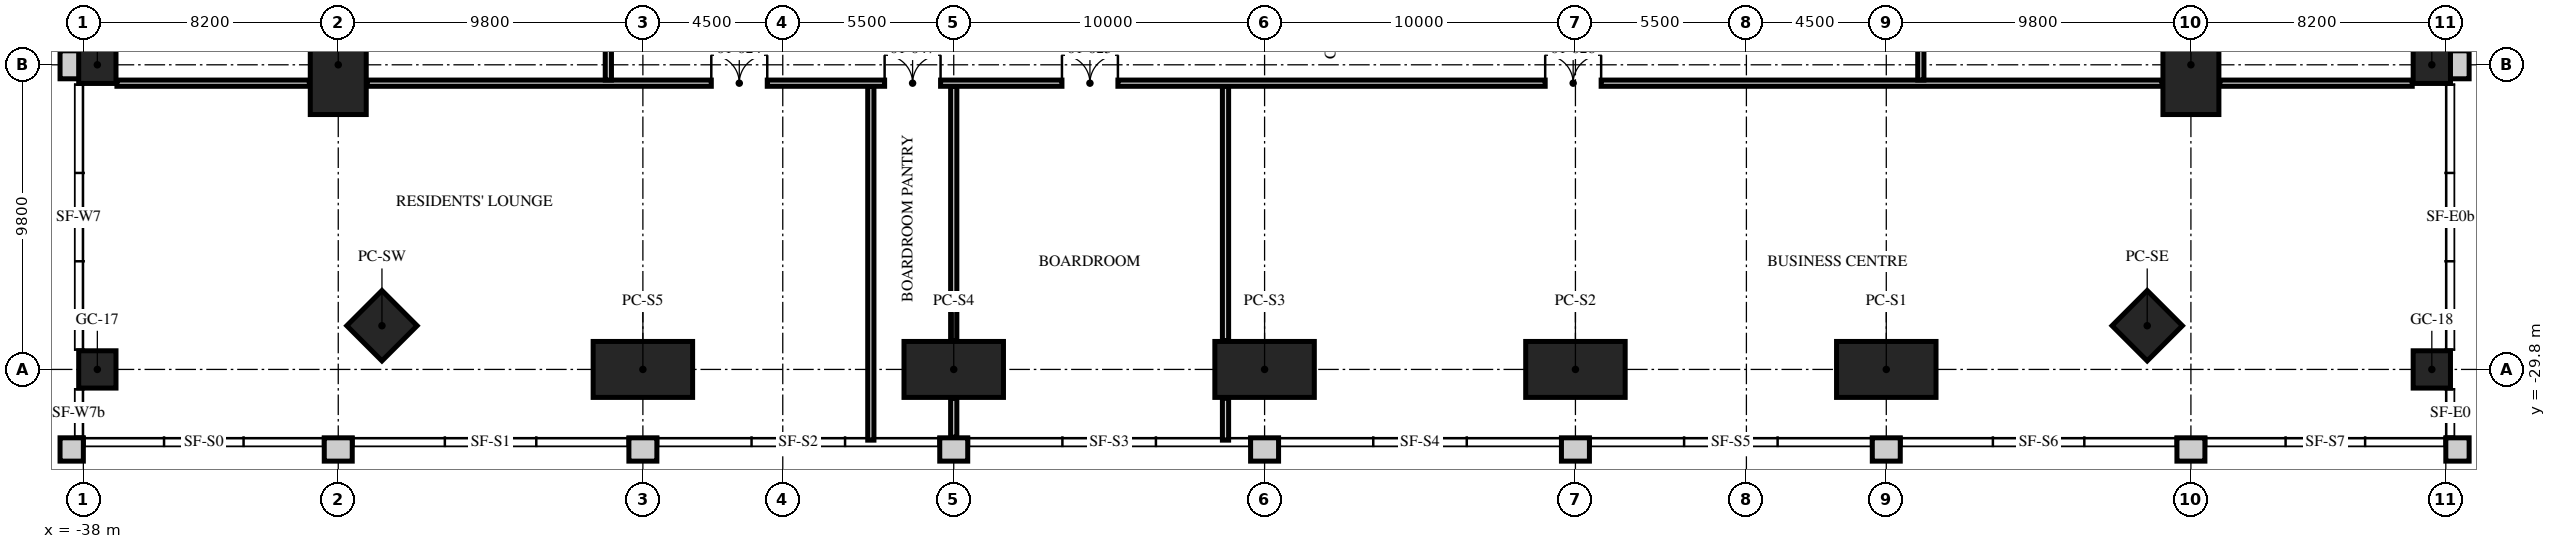
"""IFC4 building model, lengths in metres.
Left out: names, types, materials, properties, quantities, classifications, styles, units other than length and angle.
Written with IfcOpenShell. Run it as: python <this file> out.ifc"""

import sys

from ifc_helpers import new_model, si_unit, direction, frame, frame_2d, origin, origin_2d, place, context, subcontext, project, spatial, rectangle, hollow_rectangle, extrude, element, fill, save


model = new_model("IFC4")
c1 = context("Model", 3, precision=1e-05, world=origin(), true_north=direction((0.0, 1.0)))
c2 = subcontext(c1, "Body", "Model", "MODEL_VIEW")
j1 = project(units=[si_unit("LENGTHUNIT", "METRE"), si_unit("PLANEANGLEUNIT", "RADIAN")], contexts=[c1])
p1 = place(None, origin())
s1 = spatial("IfcSite", under=j1, at=p1, CompositionType="ELEMENT")
p2 = place(p1, origin())
s2 = spatial("IfcBuilding", under=s1, at=p2, CompositionType="ELEMENT")
p3 = place(p2, frame((0.0, 0.0, 6.0)))
s3 = spatial("IfcBuildingStorey", under=s2, at=p3, CompositionType="ELEMENT", Elevation=6.0)
for number, where, z_axis, x_axis in (
    (1, (29.8, -20.0, 0.0), (0.0, 0.0, 1.0), (0.0, 1.0, 0.0)),
    (2, (20.0, -29.8, 0.0), (0.0, 0.0, 1.0), (1.0, 0.0, 0.0)),
    (3, (10.0, -29.8, 0.0), (0.0, 0.0, 1.0), (1.0, 0.0, 0.0)),
    (4, (0.0, -29.8, 0.0), (0.0, 0.0, 1.0), (1.0, 0.0, 0.0)),
    (5, (-10.0, -29.8, 0.0), (0.0, 0.0, 1.0), (1.0, 0.0, 0.0)),
    (6, (-20.0, -29.8, 0.0), (0.0, 0.0, 1.0), (1.0, 0.0, 0.0)),
    (7, (-29.8, -20.0, 0.0), (0.0, 0.0, 1.0), (0.0, 1.0, 0.0)),
):
    element("IfcColumn", number, at=place(p3, frame(where, z_axis=z_axis, x_axis=x_axis)), inside=s3, PredefinedType="COLUMN", context=c2, shape_type="SweptSolid", body=[
        extrude(hollow_rectangle(XDim=3.2, YDim=1.8, WallThickness=0.2, at=origin_2d()), origin(), (0.0, 0.0, 1.0), 5.0),
    ])
for number, where, z_axis, x_axis in (
    (8, (28.394, -28.394, 0.0), (0.0, 0.0, 1.0), (0.707, 0.707, 0.0)),
    (9, (-28.394, -28.394, 0.0), (0.0, 0.0, 1.0), (0.707, -0.707, 0.0)),
):
    element("IfcColumn", number, at=place(p3, frame(where, z_axis=z_axis, x_axis=x_axis)), inside=s3, PredefinedType="COLUMN", context=c2, shape_type="SweptSolid", body=[
        extrude(hollow_rectangle(XDim=1.6, YDim=1.6, WallThickness=0.1, at=origin_2d()), origin(), (0.0, 0.0, 1.0), 5.0),
    ])
for number, where, z_axis, x_axis in (
    (10, (-37.55, -29.8, 0.0), (0.0, 0.0, 1.0), (1.0, 0.0, 0.0)),
    (11, (37.55, -29.8, 0.0), (0.0, 0.0, 1.0), (1.0, 0.0, 0.0)),
    (12, (-37.55, -20.0, 0.0), (0.0, 0.0, 1.0), (1.0, 0.0, 0.0)),
    (13, (37.55, -20.0, 0.0), (0.0, 0.0, 1.0), (1.0, 0.0, 0.0)),
):
    element("IfcColumn", number, at=place(p3, frame(where, z_axis=z_axis, x_axis=x_axis)), inside=s3, PredefinedType="COLUMN", context=c2, shape_type="SweptSolid", body=[
        extrude(rectangle(XDim=1.2, YDim=1.2, at=origin_2d()), origin(), (0.0, 0.0, 1.0), 5.0),
    ])
for number, where, z_axis, x_axis in (
    (14, (-30.25, -32.375, 0.0), (0.0, 0.0, 1.0), (1.0, 0.0, 0.0)),
    (15, (-20.45, -32.375, 0.0), (0.0, 0.0, 1.0), (1.0, 0.0, 0.0)),
    (16, (-10.45, -32.375, 0.0), (0.0, 0.0, 1.0), (1.0, 0.0, 0.0)),
    (17, (-0.45, -32.375, 0.0), (0.0, 0.0, 1.0), (1.0, 0.0, 0.0)),
    (18, (9.55, -32.375, 0.0), (0.0, 0.0, 1.0), (1.0, 0.0, 0.0)),
    (19, (19.55, -32.375, 0.0), (0.0, 0.0, 1.0), (1.0, 0.0, 0.0)),
    (20, (29.35, -32.375, 0.0), (0.0, 0.0, 1.0), (1.0, 0.0, 0.0)),
):
    element("IfcWall", number, at=place(p3, frame(where, z_axis=z_axis, x_axis=x_axis)), inside=s3, PredefinedType="SOLIDWALL", context=c2, shape_type="SweptSolid", body=[
        extrude(rectangle(XDim=0.9, YDim=0.75, at=frame_2d((0.45, 0.0))), origin(), (0.0, 0.0, 1.0), 5.0),
    ])
p4 = place(p3, frame((38.0, -32.375, 0.0), z_axis=(0.0, 0.0, 1.0), x_axis=(1.0, 0.0, 0.0)))
e21 = element("IfcWall", 21, at=p4, inside=s3, PredefinedType="SOLIDWALL", context=c2, shape_type="SweptSolid", body=[
    extrude(rectangle(XDim=0.75, YDim=0.75, at=frame_2d((0.375, 0.0))), origin(), (0.0, 0.0, 1.0), 5.0),
])
for number, where, z_axis, x_axis in (
    (22, (38.375, -20.45, 0.0), (0.0, 0.0, 1.0), (0.0, 1.0, 0.0)),
    (23, (-38.375, -19.55, 0.0), (0.0, 0.0, 1.0), (0.0, -1.0, 0.0)),
):
    element("IfcWall", number, at=place(p3, frame(where, z_axis=z_axis, x_axis=x_axis)), inside=s3, PredefinedType="SOLIDWALL", context=c2, shape_type="SweptSolid", body=[
        extrude(rectangle(XDim=0.9, YDim=0.75, at=frame_2d((0.45, 0.0))), origin(), (0.0, 0.0, 1.0), 5.0),
    ])
p5 = place(p3, frame((-38.375, -32.0, 0.0), z_axis=(0.0, 0.0, 1.0), x_axis=(0.0, -1.0, 0.0)))
e24 = element("IfcWall", 24, at=p5, inside=s3, PredefinedType="SOLIDWALL", context=c2, shape_type="SweptSolid", body=[
    extrude(rectangle(XDim=0.75, YDim=0.75, at=frame_2d((0.375, 0.0))), origin(), (0.0, 0.0, 1.0), 5.0),
])
p6 = place(p3, frame((-12.667, -32.075, 0.0), z_axis=(0.0, 0.0, 1.0), x_axis=(0.0, 1.0, 0.0)))
e25 = element("IfcWall", 25, at=p6, inside=s3, PredefinedType="SOLIDWALL", context=c2, shape_type="SweptSolid", body=[
    extrude(rectangle(XDim=11.384, YDim=0.2, at=frame_2d((5.692, 0.0))), origin(), (0.0, 0.0, 1.0), 3.7),
])
p7 = place(p3, frame((-1.257, -32.075, 0.0), z_axis=(0.0, 0.0, 1.0), x_axis=(0.0, 1.0, 0.0)))
e26 = element("IfcWall", 26, at=p7, inside=s3, PredefinedType="SOLIDWALL", context=c2, shape_type="SweptSolid", body=[
    extrude(rectangle(XDim=1.345, YDim=0.2, at=frame_2d((0.672, 0.0))), origin(), (0.0, 0.0, 1.0), 4.7),
])
p8 = place(p3, frame((-10.0, -31.98, 0.0), z_axis=(0.0, 0.0, 1.0), x_axis=(0.0, 1.0, 0.0)))
e27 = element("IfcWall", 27, at=p8, inside=s3, PredefinedType="SOLIDWALL", context=c2, shape_type="SweptSolid", body=[
    extrude(rectangle(XDim=1.25, YDim=0.2, at=frame_2d((0.625, 0.0))), origin(), (0.0, 0.0, 1.0), 4.7),
])
p9 = place(p3, frame((-10.0, -28.87, 0.0), z_axis=(0.0, 0.0, 1.0), x_axis=(0.0, 1.0, 0.0)))
e28 = element("IfcWall", 28, at=p9, inside=s3, PredefinedType="SOLIDWALL", context=c2, shape_type="SweptSolid", body=[
    extrude(rectangle(XDim=8.179, YDim=0.2, at=frame_2d((4.089, 0.0))), origin(), (0.0, 0.0, 1.0), 3.5),
])
p10 = place(p3, frame((-1.257, -28.87, 0.0), z_axis=(0.0, 0.0, 1.0), x_axis=(0.0, 1.0, 0.0)))
e29 = element("IfcWall", 29, at=p10, inside=s3, PredefinedType="SOLIDWALL", context=c2, shape_type="SweptSolid", body=[
    extrude(rectangle(XDim=8.179, YDim=0.2, at=frame_2d((4.089, 0.0))), origin(), (0.0, 0.0, 1.0), 4.7),
])
p11 = place(p3, frame((-36.92, -20.591, 0.0), z_axis=(0.0, 0.0, 1.0), x_axis=(1.0, 0.0, 0.0)))
e30 = element("IfcWall", 30, at=p11, inside=s3, PredefinedType="SOLIDWALL", context=c2, shape_type="SweptSolid", body=[
    extrude(rectangle(XDim=6.19, YDim=0.2, at=frame_2d((3.095, 0.0))), origin(), (0.0, 0.0, 1.0), 3.7),
])
p12 = place(p3, frame((-28.87, -20.591, 0.0), z_axis=(0.0, 0.0, 1.0), x_axis=(1.0, 0.0, 0.0)))
e31 = element("IfcWall", 31, at=p12, inside=s3, PredefinedType="SOLIDWALL", context=c2, shape_type="SweptSolid", body=[
    extrude(rectangle(XDim=57.74, YDim=0.2, at=frame_2d((28.87, 0.0))), origin(), (0.0, 0.0, 1.0), 3.5),
])
p13 = place(p12, frame((11.071, 0.0, 0.0)))
e32 = element("IfcOpeningElement", 32, at=p13, cuts=e31, PredefinedType="OPENING", context=c2, shape_type="SweptSolid", body=[
    extrude(rectangle(XDim=1.8, YDim=2.4, at=frame_2d((0.9, 1.2))), frame((0.0, 0.11, 0.0), z_axis=(0.0, -1.0, 0.0), x_axis=(1.0, 0.0, 0.0)), (0.0, 0.0, 1.0), 0.22),
])
p14 = place(p12, frame((22.351, 0.0, 0.0)))
e33 = element("IfcOpeningElement", 33, at=p14, cuts=e31, PredefinedType="OPENING", context=c2, shape_type="SweptSolid", body=[
    extrude(rectangle(XDim=1.8, YDim=2.4, at=frame_2d((0.9, 1.2))), frame((0.0, 0.11, 0.0), z_axis=(0.0, -1.0, 0.0), x_axis=(1.0, 0.0, 0.0)), (0.0, 0.0, 1.0), 0.22),
])
p15 = place(p12, frame((37.897, 0.0, 0.0)))
e34 = element("IfcOpeningElement", 34, at=p15, cuts=e31, PredefinedType="OPENING", context=c2, shape_type="SweptSolid", body=[
    extrude(rectangle(XDim=1.8, YDim=2.4, at=frame_2d((0.9, 1.2))), frame((0.0, 0.11, 0.0), z_axis=(0.0, -1.0, 0.0), x_axis=(1.0, 0.0, 0.0)), (0.0, 0.0, 1.0), 0.22),
])
p16 = place(p12, frame((16.646, 0.0, 0.0)))
e35 = element("IfcOpeningElement", 35, at=p16, cuts=e31, PredefinedType="OPENING", context=c2, shape_type="SweptSolid", body=[
    extrude(rectangle(XDim=1.8, YDim=2.4, at=frame_2d((0.9, 1.2))), frame((0.0, 0.11, 0.0), z_axis=(0.0, -1.0, 0.0), x_axis=(1.0, 0.0, 0.0)), (0.0, 0.0, 1.0), 0.22),
])
p17 = place(p3, frame((30.73, -20.591, 0.0), z_axis=(0.0, 0.0, 1.0), x_axis=(1.0, 0.0, 0.0)))
e36 = element("IfcWall", 36, at=p17, inside=s3, PredefinedType="SOLIDWALL", context=c2, shape_type="SweptSolid", body=[
    extrude(rectangle(XDim=6.19, YDim=0.2, at=frame_2d((3.095, 0.0))), origin(), (0.0, 0.0, 1.0), 3.7),
])
p18 = place(p3, frame((-21.111, -20.491, 0.0), z_axis=(0.0, 0.0, 1.0), x_axis=(0.0, 1.0, 0.0)))
e37 = element("IfcWall", 37, at=p18, inside=s3, PredefinedType="SOLIDWALL", context=c2, shape_type="SweptSolid", body=[
    extrude(rectangle(XDim=42.022, YDim=0.2, at=frame_2d((21.011, 0.0))), origin(), (0.0, 0.0, 1.0), 3.5),
])
p19 = place(p18, frame((4.47, 0.0, 0.0)))
e38 = element("IfcOpeningElement", 38, at=p19, cuts=e37, PredefinedType="OPENING", context=c2, shape_type="SweptSolid", body=[
    extrude(rectangle(XDim=1.8, YDim=2.4, at=frame_2d((0.9, 1.2))), frame((0.0, 0.11, 0.0), z_axis=(0.0, -1.0, 0.0), x_axis=(1.0, 0.0, 0.0)), (0.0, 0.0, 1.0), 0.22),
])
p20 = place(p18, frame((17.537, 0.0, 0.0)))
e39 = element("IfcOpeningElement", 39, at=p20, cuts=e37, PredefinedType="OPENING", context=c2, shape_type="SweptSolid", body=[
    extrude(rectangle(XDim=1.0, YDim=2.1, at=frame_2d((0.5, 1.05))), frame((0.0, 0.11, 0.0), z_axis=(0.0, -1.0, 0.0), x_axis=(1.0, 0.0, 0.0)), (0.0, 0.0, 1.0), 0.22),
])
p21 = place(p18, frame((32.768, 0.0, 0.0)))
e40 = element("IfcOpeningElement", 40, at=p21, cuts=e37, PredefinedType="OPENING", context=c2, shape_type="SweptSolid", body=[
    extrude(rectangle(XDim=1.8, YDim=2.4, at=frame_2d((0.9, 1.2))), frame((0.0, 0.11, 0.0), z_axis=(0.0, -1.0, 0.0), x_axis=(1.0, 0.0, 0.0)), (0.0, 0.0, 1.0), 0.22),
])
p22 = place(p3, frame((21.111, -20.491, 0.0), z_axis=(0.0, 0.0, 1.0), x_axis=(0.0, 1.0, 0.0)))
e41 = element("IfcWall", 41, at=p22, inside=s3, PredefinedType="SOLIDWALL", context=c2, shape_type="SweptSolid", body=[
    extrude(rectangle(XDim=42.022, YDim=0.2, at=frame_2d((21.011, 0.0))), origin(), (0.0, 0.0, 1.0), 3.5),
])
p23 = place(p22, frame((3.623, 0.0, 0.0)))
e42 = element("IfcOpeningElement", 42, at=p23, cuts=e41, PredefinedType="OPENING", context=c2, shape_type="SweptSolid", body=[
    extrude(rectangle(XDim=1.0, YDim=2.1, at=frame_2d((0.5, 1.05))), frame((0.0, 0.11, 0.0), z_axis=(0.0, -1.0, 0.0), x_axis=(1.0, 0.0, 0.0)), (0.0, 0.0, 1.0), 0.22),
])
p24 = place(p22, frame((13.14, 0.0, 0.0)))
e43 = element("IfcOpeningElement", 43, at=p24, cuts=e41, PredefinedType="OPENING", context=c2, shape_type="SweptSolid", body=[
    extrude(rectangle(XDim=1.0, YDim=2.1, at=frame_2d((0.5, 1.05))), frame((0.0, 0.11, 0.0), z_axis=(0.0, -1.0, 0.0), x_axis=(1.0, 0.0, 0.0)), (0.0, 0.0, 1.0), 0.22),
])
p25 = place(p22, frame((21.769, 0.0, 0.0)))
e44 = element("IfcOpeningElement", 44, at=p25, cuts=e41, PredefinedType="OPENING", context=c2, shape_type="SweptSolid", body=[
    extrude(rectangle(XDim=1.0, YDim=2.1, at=frame_2d((0.5, 1.05))), frame((0.0, 0.11, 0.0), z_axis=(0.0, -1.0, 0.0), x_axis=(1.0, 0.0, 0.0)), (0.0, 0.0, 1.0), 0.22),
])
p26 = place(p22, frame((31.47, 0.0, 0.0)))
e45 = element("IfcOpeningElement", 45, at=p26, cuts=e41, PredefinedType="OPENING", context=c2, shape_type="SweptSolid", body=[
    extrude(rectangle(XDim=1.0, YDim=2.1, at=frame_2d((0.5, 1.05))), frame((0.0, 0.11, 0.0), z_axis=(0.0, -1.0, 0.0), x_axis=(1.0, 0.0, 0.0)), (0.0, 0.0, 1.0), 0.22),
])
p27 = place(p22, frame((38.657, 0.0, 0.0)))
e46 = element("IfcOpeningElement", 46, at=p27, cuts=e41, PredefinedType="OPENING", context=c2, shape_type="SweptSolid", body=[
    extrude(rectangle(XDim=1.0, YDim=2.1, at=frame_2d((0.5, 1.05))), frame((0.0, 0.11, 0.0), z_axis=(0.0, -1.0, 0.0), x_axis=(1.0, 0.0, 0.0)), (0.0, 0.0, 1.0), 0.22),
])
p28 = place(p22, frame((8.918, 0.0, 0.0)))
e47 = element("IfcOpeningElement", 47, at=p28, cuts=e41, PredefinedType="OPENING", context=c2, shape_type="SweptSolid", body=[
    extrude(rectangle(XDim=1.0, YDim=2.1, at=frame_2d((0.5, 1.05))), frame((0.0, 0.11, 0.0), z_axis=(0.0, -1.0, 0.0), x_axis=(1.0, 0.0, 0.0)), (0.0, 0.0, 1.0), 0.22),
])
p29 = place(p13, origin())
e48 = element("IfcDoor", 48, at=p29, inside=s3, OperationType="DOUBLE_DOOR_SINGLE_SWING", PredefinedType="DOOR", context=c2, shape_type="SweptSolid", body=[
    extrude(rectangle(XDim=1.8, YDim=2.4, at=frame_2d((0.9, 1.2))), frame((0.0, 0.025, 0.0), z_axis=(0.0, -1.0, 0.0), x_axis=(1.0, 0.0, 0.0)), (0.0, 0.0, 1.0), 0.05),
])
fill(e32, e48)
p30 = place(p14, origin())
e49 = element("IfcDoor", 49, at=p30, inside=s3, OperationType="DOUBLE_DOOR_SINGLE_SWING", PredefinedType="DOOR", context=c2, shape_type="SweptSolid", body=[
    extrude(rectangle(XDim=1.8, YDim=2.4, at=frame_2d((0.9, 1.2))), frame((0.0, 0.025, 0.0), z_axis=(0.0, -1.0, 0.0), x_axis=(1.0, 0.0, 0.0)), (0.0, 0.0, 1.0), 0.05),
])
fill(e33, e49)
p31 = place(p15, origin())
e50 = element("IfcDoor", 50, at=p31, inside=s3, OperationType="DOUBLE_DOOR_SINGLE_SWING", PredefinedType="DOOR", context=c2, shape_type="SweptSolid", body=[
    extrude(rectangle(XDim=1.8, YDim=2.4, at=frame_2d((0.9, 1.2))), frame((0.0, 0.025, 0.0), z_axis=(0.0, -1.0, 0.0), x_axis=(1.0, 0.0, 0.0)), (0.0, 0.0, 1.0), 0.05),
])
fill(e34, e50)
p32 = place(p16, origin())
e51 = element("IfcDoor", 51, at=p32, inside=s3, OperationType="DOUBLE_DOOR_SINGLE_SWING", PredefinedType="DOOR", context=c2, shape_type="SweptSolid", body=[
    extrude(rectangle(XDim=1.8, YDim=2.4, at=frame_2d((0.9, 1.2))), frame((0.0, 0.025, 0.0), z_axis=(0.0, -1.0, 0.0), x_axis=(1.0, 0.0, 0.0)), (0.0, 0.0, 1.0), 0.05),
])
fill(e35, e51)
save(model, sys.argv[1])
